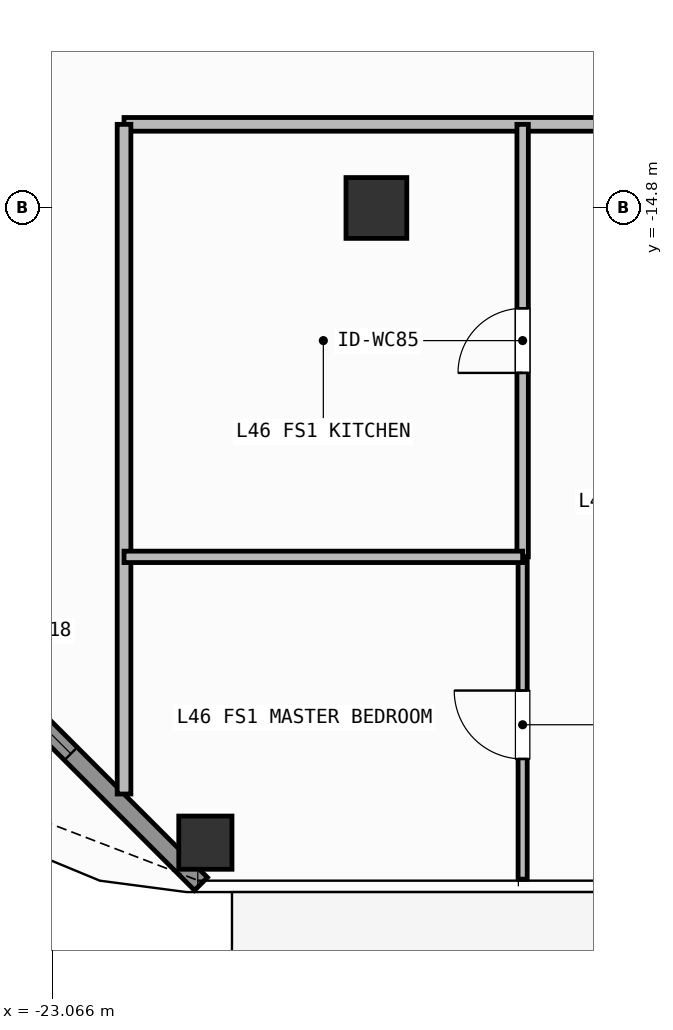
"""IFC4 building model, lengths in metres.
Left out: names, types, materials, properties, quantities, classifications, styles, units other than length and angle.
Written with IfcOpenShell. Run it as: python <this file> out.ifc"""

import sys

from ifc_helpers import new_model, si_unit, direction, frame, frame_2d, origin, origin_2d, place, context, subcontext, project, spatial, rectangle, hollow_rectangle, extrude, element, fill, save


model = new_model("IFC4")
c1 = context("Model", 3, precision=1e-05, world=origin(), true_north=direction((0.0, 1.0)))
c2 = subcontext(c1, "Body", "Model", "MODEL_VIEW")
j1 = project(units=[si_unit("LENGTHUNIT", "METRE"), si_unit("PLANEANGLEUNIT", "RADIAN")], contexts=[c1])
p1 = place(None, origin())
s1 = spatial("IfcSite", under=j1, at=p1, CompositionType="ELEMENT")
p2 = place(p1, origin())
s2 = spatial("IfcBuilding", under=s1, at=p2, CompositionType="ELEMENT")
p3 = place(p2, frame((0.0, 0.0, 187.5)))
s3 = spatial("IfcBuildingStorey", under=s2, at=p3, CompositionType="ELEMENT", Elevation=187.5)
p4 = place(p3, frame((-18.8, -14.8, 0.0), z_axis=(0.0, 0.0, 1.0), x_axis=(1.0, 0.0, 0.0)))
e1 = element("IfcColumn", 1, at=p4, inside=s3, PredefinedType="COLUMN", context=c2, shape_type="SweptSolid", body=[
    extrude(hollow_rectangle(XDim=0.8, YDim=0.8, WallThickness=0.036, at=origin_2d()), origin(), (0.0, 0.0, 1.0), 3.9),
])
p5 = place(p3, frame((-21.05, -23.15, 0.0), z_axis=(0.0, 0.0, 1.0), x_axis=(1.0, 0.0, 0.0)))
e2 = element("IfcColumn", 2, at=p5, inside=s3, PredefinedType="COLUMN", context=c2, shape_type="SweptSolid", body=[
    extrude(hollow_rectangle(XDim=0.7, YDim=0.7, WallThickness=0.032, at=origin_2d()), origin(), (0.0, 0.0, 1.0), 3.9),
])
p6 = place(p3, frame((-21.108, -23.692, 0.0), z_axis=(0.0, 0.0, 1.0), x_axis=(-0.707087534163, 0.707126027686, 0.0)))
e3 = element("IfcWall", 3, at=p6, inside=s3, PredefinedType="SOLIDWALL", context=c2, shape_type="SweptSolid", body=[
    extrude(rectangle(XDim=6.342, YDim=0.24, at=frame_2d((3.171, 0.0))), origin(), (0.0, 0.0, 1.0), 3.62),
])
p7 = place(p6, frame((2.421, 0.0, 0.8)))
e4 = element("IfcOpeningElement", 4, at=p7, cuts=e3, PredefinedType="OPENING", context=c2, shape_type="SweptSolid", body=[
    extrude(rectangle(XDim=1.5, YDim=1.85, at=frame_2d((0.75, 0.925))), frame((0.0, 0.13, 0.0), z_axis=(0.0, -1.0, 0.0), x_axis=(1.0, 0.0, 0.0)), (0.0, 0.0, 1.0), 0.26),
])
p8 = place(p3, frame((-22.12, -13.7, 0.0), z_axis=(0.0, 0.0, 1.0), x_axis=(1.0, 0.0, 0.0)))
e5 = element("IfcWall", 5, at=p8, inside=s3, PredefinedType="PARTITIONING", context=c2, shape_type="SweptSolid", body=[
    extrude(rectangle(XDim=15.502, YDim=0.18, at=frame_2d((7.751, 0.0))), origin(), (0.0, 0.0, 1.0), 3.62),
])
p9 = place(p8, frame((8.059, 0.0, 0.0)))
e6 = element("IfcOpeningElement", 6, at=p9, cuts=e5, PredefinedType="OPENING", context=c2, shape_type="SweptSolid", body=[
    extrude(rectangle(XDim=1.0, YDim=2.2, at=frame_2d((0.5, 1.1))), frame((0.0, 0.1, 0.0), z_axis=(0.0, -1.0, 0.0), x_axis=(1.0, 0.0, 0.0)), (0.0, 0.0, 1.0), 0.2),
])
p10 = place(p3, frame((-16.876, -19.39, 0.0), z_axis=(0.0, 0.0, 1.0), x_axis=(0.0, 1.0, 0.0)))
e7 = element("IfcWall", 7, at=p10, inside=s3, PredefinedType="PARTITIONING", context=c2, shape_type="SweptSolid", body=[
    extrude(rectangle(XDim=5.69, YDim=0.15, at=frame_2d((2.845, 0.0))), origin(), (0.0, 0.0, 1.0), 3.62),
])
p11 = place(p10, frame((2.42, 0.0, 0.0)))
e8 = element("IfcOpeningElement", 8, at=p11, cuts=e7, PredefinedType="OPENING", context=c2, shape_type="SweptSolid", body=[
    extrude(rectangle(XDim=0.85, YDim=2.1, at=frame_2d((0.425, 1.05))), frame((0.0, 0.085, 0.0), z_axis=(0.0, -1.0, 0.0), x_axis=(1.0, 0.0, 0.0)), (0.0, 0.0, 1.0), 0.17),
])
p12 = place(p3, frame((-16.876, -23.63, 0.0), z_axis=(0.0, 0.0, 1.0), x_axis=(0.0, 1.0, 0.0)))
e9 = element("IfcWall", 9, at=p12, inside=s3, PredefinedType="PARTITIONING", context=c2, shape_type="SweptSolid", body=[
    extrude(rectangle(XDim=4.24, YDim=0.12, at=frame_2d((2.12, 0.0))), origin(), (0.0, 0.0, 1.0), 3.62),
])
p13 = place(p12, frame((1.581, 0.0, 0.0)))
e10 = element("IfcOpeningElement", 10, at=p13, cuts=e9, PredefinedType="OPENING", context=c2, shape_type="SweptSolid", body=[
    extrude(rectangle(XDim=0.9, YDim=2.1, at=frame_2d((0.45, 1.05))), frame((0.0, 0.07, 0.0), z_axis=(0.0, -1.0, 0.0), x_axis=(1.0, 0.0, 0.0)), (0.0, 0.0, 1.0), 0.14),
])
p14 = place(p3, frame((-22.12, -22.51, 0.0), z_axis=(0.0, 0.0, 1.0), x_axis=(0.0, 1.0, 0.0)))
e11 = element("IfcWall", 11, at=p14, inside=s3, PredefinedType="PARTITIONING", context=c2, shape_type="SweptSolid", body=[
    extrude(rectangle(XDim=8.81, YDim=0.18, at=frame_2d((4.405, 0.0))), origin(), (0.0, 0.0, 1.0), 3.62),
])
p15 = place(p3, frame((-22.12, -19.39, 0.0), z_axis=(0.0, 0.0, 1.0), x_axis=(1.0, 0.0, 0.0)))
e12 = element("IfcWall", 12, at=p15, inside=s3, PredefinedType="PARTITIONING", context=c2, shape_type="SweptSolid", body=[
    extrude(rectangle(XDim=5.244, YDim=0.15, at=frame_2d((2.622, 0.0))), origin(), (0.0, 0.0, 1.0), 3.62),
])
p16 = place(p7, origin())
e13 = element("IfcWindow", 13, at=p16, inside=s3, PartitioningType="SINGLE_PANEL", PredefinedType="WINDOW", context=c2, shape_type="SweptSolid", body=[
    extrude(rectangle(XDim=1.5, YDim=1.85, at=frame_2d((0.75, 0.925))), frame((0.0, 0.03, 0.0), z_axis=(0.0, -1.0, 0.0), x_axis=(1.0, 0.0, 0.0)), (0.0, 0.0, 1.0), 0.06),
])
fill(e4, e13)
p17 = place(p11, origin())
e14 = element("IfcDoor", 14, at=p17, inside=s3, OperationType="SINGLE_SWING_LEFT", PredefinedType="DOOR", context=c2, shape_type="SweptSolid", body=[
    extrude(rectangle(XDim=0.85, YDim=2.1, at=frame_2d((0.425, 1.05))), frame((0.0, 0.025, 0.0), z_axis=(0.0, -1.0, 0.0), x_axis=(1.0, 0.0, 0.0)), (0.0, 0.0, 1.0), 0.05),
])
fill(e8, e14)
p18 = place(p13, origin())
e15 = element("IfcDoor", 15, at=p18, inside=s3, OperationType="SINGLE_SWING_RIGHT", PredefinedType="DOOR", context=c2, shape_type="SweptSolid", body=[
    extrude(rectangle(XDim=0.9, YDim=2.1, at=frame_2d((0.45, 1.05))), frame((0.0, 0.025, 0.0), z_axis=(0.0, -1.0, 0.0), x_axis=(1.0, 0.0, 0.0)), (0.0, 0.0, 1.0), 0.05),
])
fill(e10, e15)
save(model, sys.argv[1])
